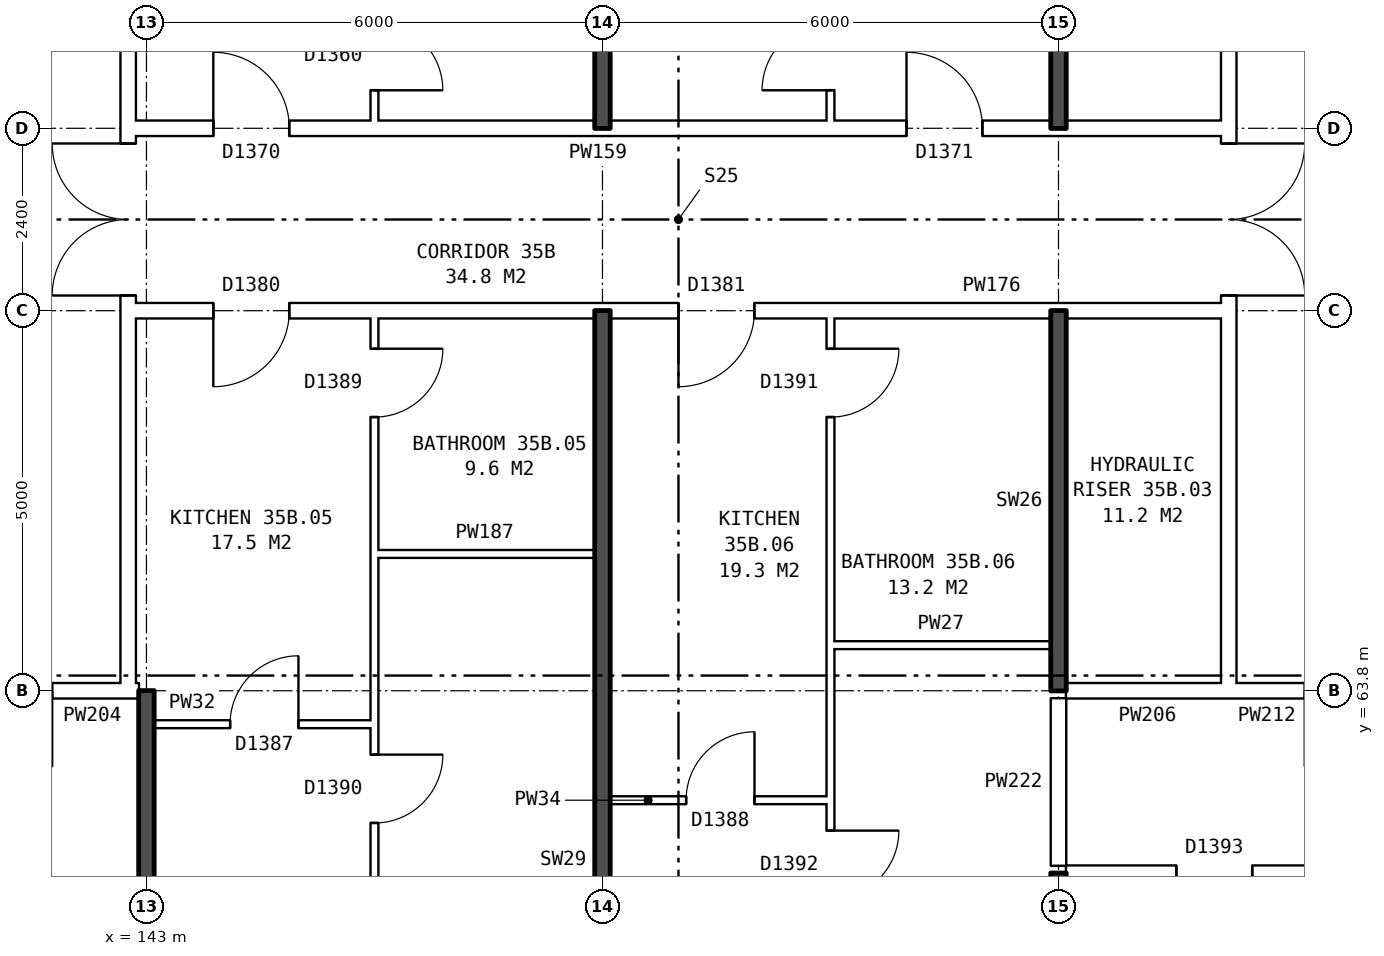
"""IFC4 building model, lengths in metres.
Left out: names, types, materials, properties, quantities, classifications, styles, units other than length and angle.
Written with IfcOpenShell. Run it as: python <this file> out.ifc"""

import sys

from ifc_helpers import new_model, si_unit, direction, frame, frame_2d, origin, place, context, subcontext, project, spatial, rectangle, extrude, element, fill, save


model = new_model("IFC4")
c1 = context("Model", 3, precision=1e-05, world=origin(), true_north=direction((0.0, 1.0)))
c2 = subcontext(c1, "Body", "Model", "MODEL_VIEW")
j1 = project(units=[si_unit("LENGTHUNIT", "METRE"), si_unit("PLANEANGLEUNIT", "RADIAN")], contexts=[c1])
p1 = place(None, origin())
s1 = spatial("IfcSite", under=j1, at=p1, CompositionType="ELEMENT")
p2 = place(p1, origin())
s2 = spatial("IfcBuilding", under=s1, at=p2, CompositionType="ELEMENT")
p3 = place(p2, frame((0.0, 0.0, 126.8)))
s3 = spatial("IfcBuildingStorey", under=s2, at=p3, CompositionType="ELEMENT", Elevation=126.8)
p4 = place(p3, frame((142.76, 63.9, 0.0), z_axis=(0.0, 0.0, 1.0), x_axis=(0.0, 1.0, 0.0)))
e1 = element("IfcWall", 1, at=p4, inside=s3, PredefinedType="PARTITIONING", context=c2, shape_type="SweptSolid", body=[
    extrude(rectangle(XDim=12.2, YDim=0.2, at=frame_2d((6.1, 0.0))), origin(), (0.0, 0.0, 1.0), 2.85),
])
p5 = place(p4, frame((5.1, 0.0, 0.0)))
e2 = element("IfcOpeningElement", 2, at=p5, cuts=e1, PredefinedType="OPENING", context=c2, shape_type="SweptSolid", body=[
    extrude(rectangle(XDim=2.0, YDim=2.1, at=frame_2d((1.0, 1.05))), frame((0.0, 0.11, 0.0), z_axis=(0.0, -1.0, 0.0), x_axis=(1.0, 0.0, 0.0)), (0.0, 0.0, 1.0), 0.22),
])
p6 = place(p3, frame((157.24, 63.9, 0.0), z_axis=(0.0, 0.0, 1.0), x_axis=(0.0, 1.0, 0.0)))
e3 = element("IfcWall", 3, at=p6, inside=s3, PredefinedType="PARTITIONING", context=c2, shape_type="SweptSolid", body=[
    extrude(rectangle(XDim=12.2, YDim=0.2, at=frame_2d((6.1, 0.0))), origin(), (0.0, 0.0, 1.0), 2.85),
])
p7 = place(p6, frame((5.1, 0.0, 0.0)))
e4 = element("IfcOpeningElement", 4, at=p7, cuts=e3, PredefinedType="OPENING", context=c2, shape_type="SweptSolid", body=[
    extrude(rectangle(XDim=2.0, YDim=2.1, at=frame_2d((1.0, 1.05))), frame((0.0, 0.11, 0.0), z_axis=(0.0, -1.0, 0.0), x_axis=(1.0, 0.0, 0.0)), (0.0, 0.0, 1.0), 0.22),
])
p8 = place(p3, frame((155.1, 61.4, 0.0), z_axis=(0.0, 0.0, 1.0), x_axis=(1.0, 0.0, 0.0)))
e5 = element("IfcWall", 5, at=p8, inside=s3, PredefinedType="PARTITIONING", context=c2, shape_type="SweptSolid", body=[
    extrude(rectangle(XDim=17.29, YDim=0.2, at=frame_2d((8.645, 0.0))), origin(), (0.0, 0.0, 1.0), 2.85),
])
p9 = place(p8, frame((1.45, 0.0, 0.0)))
e6 = element("IfcOpeningElement", 6, at=p9, cuts=e5, PredefinedType="OPENING", context=c2, shape_type="SweptSolid", body=[
    extrude(rectangle(XDim=1.0, YDim=2.1, at=frame_2d((0.5, 1.05))), frame((0.0, 0.11, 0.0), z_axis=(0.0, -1.0, 0.0), x_axis=(1.0, 0.0, 0.0)), (0.0, 0.0, 1.0), 0.22),
])
p10 = place(p8, frame((8.4, 0.0, 0.0)))
e7 = element("IfcOpeningElement", 7, at=p10, cuts=e5, PredefinedType="OPENING", context=c2, shape_type="SweptSolid", body=[
    extrude(rectangle(XDim=1.0, YDim=2.1, at=frame_2d((0.5, 1.05))), frame((0.0, 0.11, 0.0), z_axis=(0.0, -1.0, 0.0), x_axis=(1.0, 0.0, 0.0)), (0.0, 0.0, 1.0), 0.22),
])
p11 = place(p3, frame((149.1, 62.36, 0.0), z_axis=(0.0, 0.0, 1.0), x_axis=(1.0, 0.0, 0.0)))
e8 = element("IfcWall", 8, at=p11, inside=s3, PredefinedType="PARTITIONING", context=c2, shape_type="SweptSolid", body=[
    extrude(rectangle(XDim=2.9, YDim=0.1, at=frame_2d((1.45, 0.0))), origin(), (0.0, 0.0, 1.0), 2.85),
])
p12 = place(p11, frame((1.0, 0.0, 0.0)))
e9 = element("IfcOpeningElement", 9, at=p12, cuts=e8, PredefinedType="OPENING", context=c2, shape_type="SweptSolid", body=[
    extrude(rectangle(XDim=0.9, YDim=2.1, at=frame_2d((0.45, 1.05))), frame((0.0, 0.06, 0.0), z_axis=(0.0, -1.0, 0.0), x_axis=(1.0, 0.0, 0.0)), (0.0, 0.0, 1.0), 0.12),
])
p13 = place(p3, frame((143.1, 63.36, 0.0), z_axis=(0.0, 0.0, 1.0), x_axis=(1.0, 0.0, 0.0)))
e10 = element("IfcWall", 10, at=p13, inside=s3, PredefinedType="PARTITIONING", context=c2, shape_type="SweptSolid", body=[
    extrude(rectangle(XDim=2.9, YDim=0.1, at=frame_2d((1.45, 0.0))), origin(), (0.0, 0.0, 1.0), 2.85),
])
p14 = place(p13, frame((1.0, 0.0, 0.0)))
e11 = element("IfcOpeningElement", 11, at=p14, cuts=e10, PredefinedType="OPENING", context=c2, shape_type="SweptSolid", body=[
    extrude(rectangle(XDim=0.9, YDim=2.1, at=frame_2d((0.45, 1.05))), frame((0.0, 0.06, 0.0), z_axis=(0.0, -1.0, 0.0), x_axis=(1.0, 0.0, 0.0)), (0.0, 0.0, 1.0), 0.12),
])
p15 = place(p3, frame((139.76, 63.8, 0.0), z_axis=(0.0, 0.0, 1.0), x_axis=(1.0, 0.0, 0.0)))
e12 = element("IfcWall", 12, at=p15, inside=s3, PredefinedType="PARTITIONING", context=c2, shape_type="SweptSolid", body=[
    extrude(rectangle(XDim=3.0, YDim=0.2, at=frame_2d((1.5, 0.0))), origin(), (0.0, 0.0, 1.0), 2.85),
])
p16 = place(p15, frame((1.0, 0.0, 0.0)))
e13 = element("IfcOpeningElement", 13, at=p16, cuts=e12, PredefinedType="OPENING", context=c2, shape_type="SweptSolid", body=[
    extrude(rectangle(XDim=1.0, YDim=2.1, at=frame_2d((0.5, 1.05))), frame((0.0, 0.11, 0.0), z_axis=(0.0, -1.0, 0.0), x_axis=(1.0, 0.0, 0.0)), (0.0, 0.0, 1.0), 0.22),
])
p17 = place(p3, frame((142.76, 63.8, 0.0), z_axis=(0.0, 0.0, 1.0), x_axis=(1.0, 0.0, 0.0)))
e14 = element("IfcWall", 14, at=p17, inside=s3, PredefinedType="PARTITIONING", context=c2, shape_type="SweptSolid", body=[
    extrude(rectangle(XDim=0.14, YDim=0.2, at=frame_2d((0.07, 0.0))), origin(), (0.0, 0.0, 1.0), 2.85),
])
p18 = place(p3, frame((155.1, 63.8, 0.0), z_axis=(0.0, 0.0, 1.0), x_axis=(1.0, 0.0, 0.0)))
e15 = element("IfcWall", 15, at=p18, inside=s3, PredefinedType="PARTITIONING", context=c2, shape_type="SweptSolid", body=[
    extrude(rectangle(XDim=2.14, YDim=0.2, at=frame_2d((1.07, 0.0))), origin(), (0.0, 0.0, 1.0), 2.85),
])
p19 = place(p3, frame((157.24, 63.8, 0.0), z_axis=(0.0, 0.0, 1.0), x_axis=(1.0, 0.0, 0.0)))
e16 = element("IfcWall", 16, at=p19, inside=s3, PredefinedType="PARTITIONING", context=c2, shape_type="SweptSolid", body=[
    extrude(rectangle(XDim=3.0, YDim=0.2, at=frame_2d((1.5, 0.0))), origin(), (0.0, 0.0, 1.0), 2.85),
])
p20 = place(p19, frame((1.0, 0.0, 0.0)))
e17 = element("IfcOpeningElement", 17, at=p20, cuts=e16, PredefinedType="OPENING", context=c2, shape_type="SweptSolid", body=[
    extrude(rectangle(XDim=1.0, YDim=2.1, at=frame_2d((0.5, 1.05))), frame((0.0, 0.11, 0.0), z_axis=(0.0, -1.0, 0.0), x_axis=(1.0, 0.0, 0.0)), (0.0, 0.0, 1.0), 0.22),
])
for number, where, z_axis, x_axis in (
    (18, (152.0, 64.4, 0.0), (0.0, 0.0, 1.0), (1.0, 0.0, 0.0)),
    (19, (146.0, 65.6, 0.0), (0.0, 0.0, 1.0), (1.0, 0.0, 0.0)),
):
    element("IfcWall", number, at=place(p3, frame(where, z_axis=z_axis, x_axis=x_axis)), inside=s3, PredefinedType="PARTITIONING", context=c2, shape_type="SweptSolid", body=[
        extrude(rectangle(XDim=2.9, YDim=0.1, at=frame_2d((1.45, 0.0))), origin(), (0.0, 0.0, 1.0), 2.85),
    ])
p21 = place(p3, frame((142.76, 68.8, 0.0), z_axis=(0.0, 0.0, 1.0), x_axis=(1.0, 0.0, 0.0)))
e20 = element("IfcWall", 20, at=p21, inside=s3, PredefinedType="PARTITIONING", context=c2, shape_type="SweptSolid", body=[
    extrude(rectangle(XDim=14.48, YDim=0.2, at=frame_2d((7.24, 0.0))), origin(), (0.0, 0.0, 1.0), 2.85),
])
p22 = place(p21, frame((1.12, 0.0, 0.0)))
e21 = element("IfcOpeningElement", 21, at=p22, cuts=e20, PredefinedType="OPENING", context=c2, shape_type="SweptSolid", body=[
    extrude(rectangle(XDim=1.0, YDim=2.1, at=frame_2d((0.5, 1.05))), frame((0.0, 0.11, 0.0), z_axis=(0.0, -1.0, 0.0), x_axis=(1.0, 0.0, 0.0)), (0.0, 0.0, 1.0), 0.22),
])
p23 = place(p21, frame((7.24, 0.0, 0.0)))
e22 = element("IfcOpeningElement", 22, at=p23, cuts=e20, PredefinedType="OPENING", context=c2, shape_type="SweptSolid", body=[
    extrude(rectangle(XDim=1.0, YDim=2.1, at=frame_2d((0.5, 1.05))), frame((0.0, 0.11, 0.0), z_axis=(0.0, -1.0, 0.0), x_axis=(1.0, 0.0, 0.0)), (0.0, 0.0, 1.0), 0.22),
])
p24 = place(p3, frame((142.76, 71.2, 0.0), z_axis=(0.0, 0.0, 1.0), x_axis=(1.0, 0.0, 0.0)))
e23 = element("IfcWall", 23, at=p24, inside=s3, PredefinedType="PARTITIONING", context=c2, shape_type="SweptSolid", body=[
    extrude(rectangle(XDim=14.48, YDim=0.2, at=frame_2d((7.24, 0.0))), origin(), (0.0, 0.0, 1.0), 2.85),
])
p25 = place(p24, frame((1.12, 0.0, 0.0)))
e24 = element("IfcOpeningElement", 24, at=p25, cuts=e23, PredefinedType="OPENING", context=c2, shape_type="SweptSolid", body=[
    extrude(rectangle(XDim=1.0, YDim=2.1, at=frame_2d((0.5, 1.05))), frame((0.0, 0.11, 0.0), z_axis=(0.0, -1.0, 0.0), x_axis=(1.0, 0.0, 0.0)), (0.0, 0.0, 1.0), 0.22),
])
p26 = place(p24, frame((10.24, 0.0, 0.0)))
e25 = element("IfcOpeningElement", 25, at=p26, cuts=e23, PredefinedType="OPENING", context=c2, shape_type="SweptSolid", body=[
    extrude(rectangle(XDim=1.0, YDim=2.1, at=frame_2d((0.5, 1.05))), frame((0.0, 0.11, 0.0), z_axis=(0.0, -1.0, 0.0), x_axis=(1.0, 0.0, 0.0)), (0.0, 0.0, 1.0), 0.22),
])
p27 = place(p3, frame((143.0, 54.36, 0.0), z_axis=(0.0, 0.0, 1.0), x_axis=(0.0, 1.0, 0.0)))
e26 = element("IfcWall", 26, at=p27, inside=s3, PredefinedType="SOLIDWALL", context=c2, shape_type="SweptSolid", body=[
    extrude(rectangle(XDim=9.44, YDim=0.2, at=frame_2d((4.72, 0.0))), origin(), (0.0, 0.0, 1.0), 2.85),
])
p28 = place(p3, frame((146.0, 54.36, 0.0), z_axis=(0.0, 0.0, 1.0), x_axis=(0.0, 1.0, 0.0)))
e27 = element("IfcWall", 27, at=p28, inside=s3, PredefinedType="PARTITIONING", context=c2, shape_type="SweptSolid", body=[
    extrude(rectangle(XDim=14.34, YDim=0.1, at=frame_2d((7.17, 0.0))), origin(), (0.0, 0.0, 1.0), 2.85),
])
p29 = place(p28, frame((7.7, 0.0, 0.0)))
e28 = element("IfcOpeningElement", 28, at=p29, cuts=e27, PredefinedType="OPENING", context=c2, shape_type="SweptSolid", body=[
    extrude(rectangle(XDim=0.9, YDim=2.1, at=frame_2d((0.45, 1.05))), frame((0.0, 0.06, 0.0), z_axis=(0.0, -1.0, 0.0), x_axis=(1.0, 0.0, 0.0)), (0.0, 0.0, 1.0), 0.12),
])
p30 = place(p28, frame((13.04, 0.0, 0.0)))
e29 = element("IfcOpeningElement", 29, at=p30, cuts=e27, PredefinedType="OPENING", context=c2, shape_type="SweptSolid", body=[
    extrude(rectangle(XDim=0.9, YDim=2.1, at=frame_2d((0.45, 1.05))), frame((0.0, 0.06, 0.0), z_axis=(0.0, -1.0, 0.0), x_axis=(1.0, 0.0, 0.0)), (0.0, 0.0, 1.0), 0.12),
])
p31 = place(p3, frame((146.0, 71.3, 0.0), z_axis=(0.0, 0.0, 1.0), x_axis=(0.0, 1.0, 0.0)))
e30 = element("IfcWall", 30, at=p31, inside=s3, PredefinedType="PARTITIONING", context=c2, shape_type="SweptSolid", body=[
    extrude(rectangle(XDim=14.34, YDim=0.1, at=frame_2d((7.17, 0.0))), origin(), (0.0, 0.0, 1.0), 2.85),
])
p32 = place(p31, frame((6.74, 0.0, 0.0)))
e31 = element("IfcOpeningElement", 31, at=p32, cuts=e30, PredefinedType="OPENING", context=c2, shape_type="SweptSolid", body=[
    extrude(rectangle(XDim=0.9, YDim=2.1, at=frame_2d((0.45, 1.05))), frame((0.0, 0.06, 0.0), z_axis=(0.0, -1.0, 0.0), x_axis=(1.0, 0.0, 0.0)), (0.0, 0.0, 1.0), 0.12),
])
p33 = place(p31, frame((0.4, 0.0, 0.0)))
e32 = element("IfcOpeningElement", 32, at=p33, cuts=e30, PredefinedType="OPENING", context=c2, shape_type="SweptSolid", body=[
    extrude(rectangle(XDim=0.9, YDim=2.1, at=frame_2d((0.45, 1.05))), frame((0.0, 0.06, 0.0), z_axis=(0.0, -1.0, 0.0), x_axis=(1.0, 0.0, 0.0)), (0.0, 0.0, 1.0), 0.12),
])
for number, where, z_axis, x_axis in (
    (33, (149.0, 54.36, 0.0), (0.0, 0.0, 1.0), (0.0, 1.0, 0.0)),
    (34, (149.0, 71.2, 0.0), (0.0, 0.0, 1.0), (0.0, 1.0, 0.0)),
):
    element("IfcWall", number, at=place(p3, frame(where, z_axis=z_axis, x_axis=x_axis)), inside=s3, PredefinedType="SOLIDWALL", context=c2, shape_type="SweptSolid", body=[
        extrude(rectangle(XDim=14.44, YDim=0.2, at=frame_2d((7.22, 0.0))), origin(), (0.0, 0.0, 1.0), 2.85),
    ])
p34 = place(p3, frame((152.0, 54.36, 0.0), z_axis=(0.0, 0.0, 1.0), x_axis=(0.0, 1.0, 0.0)))
e35 = element("IfcWall", 35, at=p34, inside=s3, PredefinedType="PARTITIONING", context=c2, shape_type="SweptSolid", body=[
    extrude(rectangle(XDim=14.34, YDim=0.1, at=frame_2d((7.17, 0.0))), origin(), (0.0, 0.0, 1.0), 2.85),
])
p35 = place(p34, frame((6.7, 0.0, 0.0)))
e36 = element("IfcOpeningElement", 36, at=p35, cuts=e35, PredefinedType="OPENING", context=c2, shape_type="SweptSolid", body=[
    extrude(rectangle(XDim=0.9, YDim=2.1, at=frame_2d((0.45, 1.05))), frame((0.0, 0.06, 0.0), z_axis=(0.0, -1.0, 0.0), x_axis=(1.0, 0.0, 0.0)), (0.0, 0.0, 1.0), 0.12),
])
p36 = place(p34, frame((13.04, 0.0, 0.0)))
e37 = element("IfcOpeningElement", 37, at=p36, cuts=e35, PredefinedType="OPENING", context=c2, shape_type="SweptSolid", body=[
    extrude(rectangle(XDim=0.9, YDim=2.1, at=frame_2d((0.45, 1.05))), frame((0.0, 0.06, 0.0), z_axis=(0.0, -1.0, 0.0), x_axis=(1.0, 0.0, 0.0)), (0.0, 0.0, 1.0), 0.12),
])
p37 = place(p3, frame((152.0, 71.3, 0.0), z_axis=(0.0, 0.0, 1.0), x_axis=(0.0, 1.0, 0.0)))
e38 = element("IfcWall", 38, at=p37, inside=s3, PredefinedType="PARTITIONING", context=c2, shape_type="SweptSolid", body=[
    extrude(rectangle(XDim=14.34, YDim=0.1, at=frame_2d((7.17, 0.0))), origin(), (0.0, 0.0, 1.0), 2.85),
])
p38 = place(p37, frame((6.74, 0.0, 0.0)))
e39 = element("IfcOpeningElement", 39, at=p38, cuts=e38, PredefinedType="OPENING", context=c2, shape_type="SweptSolid", body=[
    extrude(rectangle(XDim=0.9, YDim=2.1, at=frame_2d((0.45, 1.05))), frame((0.0, 0.06, 0.0), z_axis=(0.0, -1.0, 0.0), x_axis=(1.0, 0.0, 0.0)), (0.0, 0.0, 1.0), 0.12),
])
p39 = place(p37, frame((0.4, 0.0, 0.0)))
e40 = element("IfcOpeningElement", 40, at=p39, cuts=e38, PredefinedType="OPENING", context=c2, shape_type="SweptSolid", body=[
    extrude(rectangle(XDim=0.9, YDim=2.1, at=frame_2d((0.45, 1.05))), frame((0.0, 0.06, 0.0), z_axis=(0.0, -1.0, 0.0), x_axis=(1.0, 0.0, 0.0)), (0.0, 0.0, 1.0), 0.12),
])
p40 = place(p3, frame((155.0, 54.36, 0.0), z_axis=(0.0, 0.0, 1.0), x_axis=(0.0, 1.0, 0.0)))
e41 = element("IfcWall", 41, at=p40, inside=s3, PredefinedType="SOLIDWALL", context=c2, shape_type="SweptSolid", body=[
    extrude(rectangle(XDim=7.04, YDim=0.2, at=frame_2d((3.52, 0.0))), origin(), (0.0, 0.0, 1.0), 2.85),
])
p41 = place(p3, frame((155.0, 61.5, 0.0), z_axis=(0.0, 0.0, 1.0), x_axis=(0.0, 1.0, 0.0)))
e42 = element("IfcWall", 42, at=p41, inside=s3, PredefinedType="PARTITIONING", context=c2, shape_type="SweptSolid", body=[
    extrude(rectangle(XDim=2.2, YDim=0.2, at=frame_2d((1.1, 0.0))), origin(), (0.0, 0.0, 1.0), 2.85),
])
for number, where, z_axis, x_axis in (
    (43, (155.0, 63.8, 0.0), (0.0, 0.0, 1.0), (0.0, 1.0, 0.0)),
    (44, (155.0, 71.2, 0.0), (0.0, 0.0, 1.0), (0.0, 1.0, 0.0)),
):
    element("IfcWall", number, at=place(p3, frame(where, z_axis=z_axis, x_axis=x_axis)), inside=s3, PredefinedType="SOLIDWALL", context=c2, shape_type="SweptSolid", body=[
        extrude(rectangle(XDim=5.0, YDim=0.2, at=frame_2d((2.5, 0.0))), origin(), (0.0, 0.0, 1.0), 2.85),
    ])
p42 = place(p5, origin())
e45 = element("IfcDoor", 45, at=p42, inside=s3, OperationType="DOUBLE_DOOR_SINGLE_SWING", PredefinedType="DOOR", context=c2, shape_type="SweptSolid", body=[
    extrude(rectangle(XDim=2.0, YDim=2.1, at=frame_2d((1.0, 1.05))), frame((0.0, 0.025, 0.0), z_axis=(0.0, -1.0, 0.0), x_axis=(1.0, 0.0, 0.0)), (0.0, 0.0, 1.0), 0.05),
])
fill(e2, e45)
p43 = place(p7, frame((2.0, 0.0, 0.0), z_axis=(0.0, 0.0, 1.0), x_axis=(-1.0, 0.0, 0.0)))
e46 = element("IfcDoor", 46, at=p43, inside=s3, OperationType="DOUBLE_DOOR_SINGLE_SWING", PredefinedType="DOOR", context=c2, shape_type="SweptSolid", body=[
    extrude(rectangle(XDim=2.0, YDim=2.1, at=frame_2d((1.0, 1.05))), frame((0.0, 0.025, 0.0), z_axis=(0.0, -1.0, 0.0), x_axis=(1.0, 0.0, 0.0)), (0.0, 0.0, 1.0), 0.05),
])
fill(e4, e46)
p44 = place(p29, frame((0.9, 0.0, 0.0), z_axis=(0.0, 0.0, 1.0), x_axis=(-1.0, 0.0, 0.0)))
e47 = element("IfcDoor", 47, at=p44, inside=s3, OperationType="SINGLE_SWING_LEFT", PredefinedType="DOOR", context=c2, shape_type="SweptSolid", body=[
    extrude(rectangle(XDim=0.9, YDim=2.1, at=frame_2d((0.45, 1.05))), frame((0.0, 0.025, 0.0), z_axis=(0.0, -1.0, 0.0), x_axis=(1.0, 0.0, 0.0)), (0.0, 0.0, 1.0), 0.05),
])
fill(e28, e47)
p45 = place(p22, frame((1.0, 0.0, 0.0), z_axis=(0.0, 0.0, 1.0), x_axis=(-1.0, 0.0, 0.0)))
e48 = element("IfcDoor", 48, at=p45, inside=s3, OperationType="SINGLE_SWING_RIGHT", PredefinedType="DOOR", context=c2, shape_type="SweptSolid", body=[
    extrude(rectangle(XDim=1.0, YDim=2.1, at=frame_2d((0.5, 1.05))), frame((0.0, 0.025, 0.0), z_axis=(0.0, -1.0, 0.0), x_axis=(1.0, 0.0, 0.0)), (0.0, 0.0, 1.0), 0.05),
])
fill(e21, e48)
p46 = place(p14, origin())
e49 = element("IfcDoor", 49, at=p46, inside=s3, OperationType="SINGLE_SWING_RIGHT", PredefinedType="DOOR", context=c2, shape_type="SweptSolid", body=[
    extrude(rectangle(XDim=0.9, YDim=2.1, at=frame_2d((0.45, 1.05))), frame((0.0, 0.025, 0.0), z_axis=(0.0, -1.0, 0.0), x_axis=(1.0, 0.0, 0.0)), (0.0, 0.0, 1.0), 0.05),
])
fill(e11, e49)
p47 = place(p30, frame((0.9, 0.0, 0.0), z_axis=(0.0, 0.0, 1.0), x_axis=(-1.0, 0.0, 0.0)))
e50 = element("IfcDoor", 50, at=p47, inside=s3, OperationType="SINGLE_SWING_LEFT", PredefinedType="DOOR", context=c2, shape_type="SweptSolid", body=[
    extrude(rectangle(XDim=0.9, YDim=2.1, at=frame_2d((0.45, 1.05))), frame((0.0, 0.025, 0.0), z_axis=(0.0, -1.0, 0.0), x_axis=(1.0, 0.0, 0.0)), (0.0, 0.0, 1.0), 0.05),
])
fill(e29, e50)
p48 = place(p35, frame((0.9, 0.0, 0.0), z_axis=(0.0, 0.0, 1.0), x_axis=(-1.0, 0.0, 0.0)))
e51 = element("IfcDoor", 51, at=p48, inside=s3, OperationType="SINGLE_SWING_LEFT", PredefinedType="DOOR", context=c2, shape_type="SweptSolid", body=[
    extrude(rectangle(XDim=0.9, YDim=2.1, at=frame_2d((0.45, 1.05))), frame((0.0, 0.025, 0.0), z_axis=(0.0, -1.0, 0.0), x_axis=(1.0, 0.0, 0.0)), (0.0, 0.0, 1.0), 0.05),
])
fill(e36, e51)
p49 = place(p23, frame((1.0, 0.0, 0.0), z_axis=(0.0, 0.0, 1.0), x_axis=(-1.0, 0.0, 0.0)))
e52 = element("IfcDoor", 52, at=p49, inside=s3, OperationType="SINGLE_SWING_RIGHT", PredefinedType="DOOR", context=c2, shape_type="SweptSolid", body=[
    extrude(rectangle(XDim=1.0, YDim=2.1, at=frame_2d((0.5, 1.05))), frame((0.0, 0.025, 0.0), z_axis=(0.0, -1.0, 0.0), x_axis=(1.0, 0.0, 0.0)), (0.0, 0.0, 1.0), 0.05),
])
fill(e22, e52)
p50 = place(p12, origin())
e53 = element("IfcDoor", 53, at=p50, inside=s3, OperationType="SINGLE_SWING_RIGHT", PredefinedType="DOOR", context=c2, shape_type="SweptSolid", body=[
    extrude(rectangle(XDim=0.9, YDim=2.1, at=frame_2d((0.45, 1.05))), frame((0.0, 0.025, 0.0), z_axis=(0.0, -1.0, 0.0), x_axis=(1.0, 0.0, 0.0)), (0.0, 0.0, 1.0), 0.05),
])
fill(e9, e53)
p51 = place(p36, frame((0.9, 0.0, 0.0), z_axis=(0.0, 0.0, 1.0), x_axis=(-1.0, 0.0, 0.0)))
e54 = element("IfcDoor", 54, at=p51, inside=s3, OperationType="SINGLE_SWING_LEFT", PredefinedType="DOOR", context=c2, shape_type="SweptSolid", body=[
    extrude(rectangle(XDim=0.9, YDim=2.1, at=frame_2d((0.45, 1.05))), frame((0.0, 0.025, 0.0), z_axis=(0.0, -1.0, 0.0), x_axis=(1.0, 0.0, 0.0)), (0.0, 0.0, 1.0), 0.05),
])
fill(e37, e54)
p52 = place(p25, origin())
e55 = element("IfcDoor", 55, at=p52, inside=s3, OperationType="SINGLE_SWING_LEFT", PredefinedType="DOOR", context=c2, shape_type="SweptSolid", body=[
    extrude(rectangle(XDim=1.0, YDim=2.1, at=frame_2d((0.5, 1.05))), frame((0.0, 0.025, 0.0), z_axis=(0.0, -1.0, 0.0), x_axis=(1.0, 0.0, 0.0)), (0.0, 0.0, 1.0), 0.05),
])
fill(e24, e55)
p53 = place(p33, frame((0.9, 0.0, 0.0), z_axis=(0.0, 0.0, 1.0), x_axis=(-1.0, 0.0, 0.0)))
e56 = element("IfcDoor", 56, at=p53, inside=s3, OperationType="SINGLE_SWING_RIGHT", PredefinedType="DOOR", context=c2, shape_type="SweptSolid", body=[
    extrude(rectangle(XDim=0.9, YDim=2.1, at=frame_2d((0.45, 1.05))), frame((0.0, 0.025, 0.0), z_axis=(0.0, -1.0, 0.0), x_axis=(1.0, 0.0, 0.0)), (0.0, 0.0, 1.0), 0.05),
])
fill(e32, e56)
p54 = place(p26, origin())
e57 = element("IfcDoor", 57, at=p54, inside=s3, OperationType="SINGLE_SWING_LEFT", PredefinedType="DOOR", context=c2, shape_type="SweptSolid", body=[
    extrude(rectangle(XDim=1.0, YDim=2.1, at=frame_2d((0.5, 1.05))), frame((0.0, 0.025, 0.0), z_axis=(0.0, -1.0, 0.0), x_axis=(1.0, 0.0, 0.0)), (0.0, 0.0, 1.0), 0.05),
])
fill(e25, e57)
p55 = place(p39, origin())
e58 = element("IfcDoor", 58, at=p55, inside=s3, OperationType="SINGLE_SWING_LEFT", PredefinedType="DOOR", context=c2, shape_type="SweptSolid", body=[
    extrude(rectangle(XDim=0.9, YDim=2.1, at=frame_2d((0.45, 1.05))), frame((0.0, 0.025, 0.0), z_axis=(0.0, -1.0, 0.0), x_axis=(1.0, 0.0, 0.0)), (0.0, 0.0, 1.0), 0.05),
])
fill(e40, e58)
p56 = place(p9, frame((1.0, 0.0, 0.0), z_axis=(0.0, 0.0, 1.0), x_axis=(-1.0, 0.0, 0.0)))
e59 = element("IfcDoor", 59, at=p56, inside=s3, OperationType="SINGLE_SWING_LEFT", PredefinedType="DOOR", context=c2, shape_type="SweptSolid", body=[
    extrude(rectangle(XDim=1.0, YDim=2.1, at=frame_2d((0.5, 1.05))), frame((0.0, 0.025, 0.0), z_axis=(0.0, -1.0, 0.0), x_axis=(1.0, 0.0, 0.0)), (0.0, 0.0, 1.0), 0.05),
])
fill(e6, e59)
save(model, sys.argv[1])
